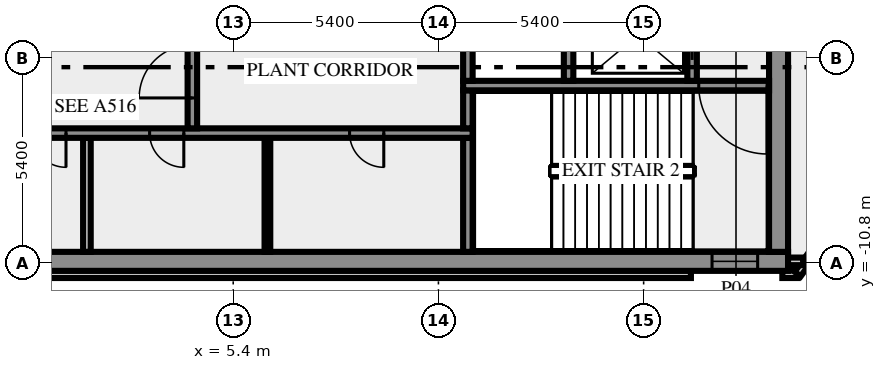
"""IFC4 building model, lengths in metres.
Left out: names, types, materials, properties, quantities, classifications, styles, units other than length and angle.
Written with IfcOpenShell. Run it as: python <this file> out.ifc"""

import sys

from ifc_helpers import new_model, si_unit, direction, frame, frame_2d, origin, place, context, subcontext, project, spatial, rectangle, extrude, element, fill, save


model = new_model("IFC4")
c1 = context("Model", 3, precision=1e-05, world=origin(), true_north=direction((0.0, 1.0)))
c2 = subcontext(c1, "Body", "Model", "MODEL_VIEW")
j1 = project(units=[si_unit("LENGTHUNIT", "METRE"), si_unit("PLANEANGLEUNIT", "RADIAN")], contexts=[c1])
p1 = place(None, origin())
s1 = spatial("IfcSite", under=j1, at=p1, CompositionType="ELEMENT")
p2 = place(p1, origin())
s2 = spatial("IfcBuilding", under=s1, at=p2, CompositionType="ELEMENT")
p3 = place(p2, frame((0.0, 0.0, 301.0)))
s3 = spatial("IfcBuildingStorey", under=s2, at=p3, CompositionType="ELEMENT", Elevation=301.0)
p4 = place(p3, frame((-17.444, -11.088, 0.0), z_axis=(0.0, 0.0, 1.0), x_axis=(1.0, 0.0, 0.0)))
e1 = element("IfcWall", 1, at=p4, inside=s3, PredefinedType="SOLIDWALL", context=c2, shape_type="SweptSolid", body=[
    extrude(rectangle(XDim=34.888, YDim=0.2, at=frame_2d((17.444, 0.0))), origin(), (0.0, 0.0, 1.0), 5.65),
])
p5 = place(p3, frame((19.85, -11.088, 0.0), z_axis=(0.0, 0.0, 1.0), x_axis=(1.0, 0.0, 0.0)))
e2 = element("IfcWall", 2, at=p5, inside=s3, PredefinedType="SOLIDWALL", context=c2, shape_type="SweptSolid", body=[
    extrude(rectangle(XDim=0.406, YDim=0.2, at=frame_2d((0.203, 0.0))), origin(), (0.0, 0.0, 1.0), 5.65),
])
p6 = place(p3, frame((20.253, -11.083, 0.0), z_axis=(0.0, 0.0, 1.0), x_axis=(0.587766567315, 0.809030569476, 0.0)))
e3 = element("IfcWall", 3, at=p6, inside=s3, PredefinedType="SOLIDWALL", context=c2, shape_type="SweptSolid", body=[
    extrude(rectangle(XDim=2.688, YDim=0.2, at=frame_2d((1.344, 0.0))), origin(), (0.0, 0.0, 1.0), 5.65),
])
p7 = place(p3, frame((19.98, -10.75, 0.0), z_axis=(0.0, 0.0, 1.0), x_axis=(1.0, 0.0, 0.0)))
e4 = element("IfcWall", 4, at=p7, inside=s3, PredefinedType="SOLIDWALL", context=c2, shape_type="SweptSolid", body=[
    extrude(rectangle(XDim=0.417, YDim=0.2, at=frame_2d((0.208, 0.0))), origin(), (0.0, 0.0, 1.0), 5.65),
])
p8 = place(p3, frame((-20.0, -10.75, 0.0), z_axis=(0.0, 0.0, 1.0), x_axis=(1.0, 0.0, 0.0)))
e5 = element("IfcWall", 5, at=p8, inside=s3, PredefinedType="SHEAR", context=c2, shape_type="SweptSolid", body=[
    extrude(rectangle(XDim=40.0, YDim=0.5, at=frame_2d((20.0, 0.0))), origin(), (0.0, 0.0, 1.0), 5.65),
])
p9 = place(p8, frame((0.8, 0.0, 1.0)))
e6 = element("IfcOpeningElement", 6, at=p9, cuts=e5, PredefinedType="OPENING", context=c2, shape_type="SweptSolid", body=[
    extrude(rectangle(XDim=1.2, YDim=1.2, at=frame_2d((0.6, 0.6))), frame((0.0, 0.26, 0.0), z_axis=(0.0, -1.0, 0.0), x_axis=(1.0, 0.0, 0.0)), (0.0, 0.0, 1.0), 0.52),
])
p10 = place(p8, frame((38.0, 0.0, 1.0)))
e7 = element("IfcOpeningElement", 7, at=p10, cuts=e5, PredefinedType="OPENING", context=c2, shape_type="SweptSolid", body=[
    extrude(rectangle(XDim=1.2, YDim=1.2, at=frame_2d((0.6, 0.6))), frame((0.0, 0.26, 0.0), z_axis=(0.0, -1.0, 0.0), x_axis=(1.0, 0.0, 0.0)), (0.0, 0.0, 1.0), 0.52),
])
p11 = place(p3, frame((1.55, -10.5, 0.0), z_axis=(0.0, 0.0, 1.0), x_axis=(0.0, 1.0, 0.0)))
e8 = element("IfcWall", 8, at=p11, inside=s3, PredefinedType="SOLIDWALL", context=c2, shape_type="SweptSolid", body=[
    extrude(rectangle(XDim=3.0, YDim=0.2, at=frame_2d((1.5, 0.0))), origin(), (0.0, 0.0, 1.0), 5.65),
])
p12 = place(p3, frame((6.3, -10.5, 0.0), z_axis=(0.0, 0.0, 1.0), x_axis=(0.0, 1.0, 0.0)))
e9 = element("IfcWall", 9, at=p12, inside=s3, PredefinedType="PARTITIONING", context=c2, shape_type="SweptSolid", body=[
    extrude(rectangle(XDim=3.0, YDim=0.15, at=frame_2d((1.5, 0.0))), origin(), (0.0, 0.0, 1.0), 5.65),
])
p13 = place(p3, frame((11.575, -10.5, 0.0), z_axis=(0.0, 0.0, 1.0), x_axis=(0.0, 1.0, 0.0)))
e10 = element("IfcWall", 10, at=p13, inside=s3, PredefinedType="SHEAR", context=c2, shape_type="SweptSolid", body=[
    extrude(rectangle(XDim=3.0, YDim=0.25, at=frame_2d((1.5, 0.0))), origin(), (0.0, 0.0, 1.0), 5.65),
])
p14 = place(p3, frame((19.75, -10.5, 0.0), z_axis=(0.0, 0.0, 1.0), x_axis=(0.0, 1.0, 0.0)))
e11 = element("IfcWall", 11, at=p14, inside=s3, PredefinedType="SHEAR", context=c2, shape_type="SweptSolid", body=[
    extrude(rectangle(XDim=8.8, YDim=0.5, at=frame_2d((4.4, 0.0))), origin(), (0.0, 0.0, 1.0), 5.65),
])
p15 = place(p3, frame((11.7, -7.375, 0.0), z_axis=(0.0, 0.0, 1.0), x_axis=(-1.0, 0.0, 0.0)))
e12 = element("IfcWall", 12, at=p15, inside=s3, PredefinedType="SHEAR", context=c2, shape_type="SweptSolid", body=[
    extrude(rectangle(XDim=23.4, YDim=0.25, at=frame_2d((11.7, 0.0))), origin(), (0.0, 0.0, 1.0), 5.65),
])
p16 = place(p15, frame((13.475, 0.0, 0.0)))
e13 = element("IfcOpeningElement", 13, at=p16, cuts=e12, PredefinedType="OPENING", context=c2, shape_type="SweptSolid", body=[
    extrude(rectangle(XDim=0.9, YDim=2.1, at=frame_2d((0.45, 1.05))), frame((0.0, 0.135, 0.0), z_axis=(0.0, -1.0, 0.0), x_axis=(1.0, 0.0, 0.0)), (0.0, 0.0, 1.0), 0.27),
])
p17 = place(p15, frame((10.7, 0.0, 0.0)))
e14 = element("IfcOpeningElement", 14, at=p17, cuts=e12, PredefinedType="OPENING", context=c2, shape_type="SweptSolid", body=[
    extrude(rectangle(XDim=0.9, YDim=2.1, at=frame_2d((0.45, 1.05))), frame((0.0, 0.135, 0.0), z_axis=(0.0, -1.0, 0.0), x_axis=(1.0, 0.0, 0.0)), (0.0, 0.0, 1.0), 0.27),
])
p18 = place(p15, frame((7.6, 0.0, 0.0)))
e15 = element("IfcOpeningElement", 15, at=p18, cuts=e12, PredefinedType="OPENING", context=c2, shape_type="SweptSolid", body=[
    extrude(rectangle(XDim=0.9, YDim=2.1, at=frame_2d((0.45, 1.05))), frame((0.0, 0.135, 0.0), z_axis=(0.0, -1.0, 0.0), x_axis=(1.0, 0.0, 0.0)), (0.0, 0.0, 1.0), 0.27),
])
p19 = place(p15, frame((2.338, 0.0, 0.0)))
e16 = element("IfcOpeningElement", 16, at=p19, cuts=e12, PredefinedType="OPENING", context=c2, shape_type="SweptSolid", body=[
    extrude(rectangle(XDim=0.9, YDim=2.1, at=frame_2d((0.45, 1.05))), frame((0.0, 0.135, 0.0), z_axis=(0.0, -1.0, 0.0), x_axis=(1.0, 0.0, 0.0)), (0.0, 0.0, 1.0), 0.27),
])
p20 = place(p3, frame((4.325, -7.25, 0.0), z_axis=(0.0, 0.0, 1.0), x_axis=(0.0, 1.0, 0.0)))
e17 = element("IfcWall", 17, at=p20, inside=s3, PredefinedType="SHEAR", context=c2, shape_type="SweptSolid", body=[
    extrude(rectangle(XDim=3.0, YDim=0.25, at=frame_2d((1.5, 0.0))), origin(), (0.0, 0.0, 1.0), 5.65),
])
p21 = place(p20, frame((0.8, 0.0, 0.0)))
e18 = element("IfcOpeningElement", 18, at=p21, cuts=e17, PredefinedType="OPENING", context=c2, shape_type="SweptSolid", body=[
    extrude(rectangle(XDim=1.4, YDim=2.1, at=frame_2d((0.7, 1.05))), frame((0.0, 0.135, 0.0), z_axis=(0.0, -1.0, 0.0), x_axis=(1.0, 0.0, 0.0)), (0.0, 0.0, 1.0), 0.27),
])
p22 = place(p3, frame((11.575, -7.25, 0.0), z_axis=(0.0, 0.0, 1.0), x_axis=(0.0, 1.0, 0.0)))
e19 = element("IfcWall", 19, at=p22, inside=s3, PredefinedType="SHEAR", context=c2, shape_type="SweptSolid", body=[
    extrude(rectangle(XDim=1.0, YDim=0.25, at=frame_2d((0.5, 0.0))), origin(), (0.0, 0.0, 1.0), 5.65),
])
p23 = place(p3, frame((19.5, -6.125, 0.0), z_axis=(0.0, 0.0, 1.0), x_axis=(-1.0, 0.0, 0.0)))
e20 = element("IfcWall", 20, at=p23, inside=s3, PredefinedType="SHEAR", context=c2, shape_type="SweptSolid", body=[
    extrude(rectangle(XDim=8.05, YDim=0.25, at=frame_2d((4.025, 0.0))), origin(), (0.0, 0.0, 1.0), 5.65),
])
p24 = place(p23, frame((0.05, 0.0, 0.0)))
e21 = element("IfcOpeningElement", 21, at=p24, cuts=e20, PredefinedType="OPENING", context=c2, shape_type="SweptSolid", body=[
    extrude(rectangle(XDim=1.8, YDim=2.1, at=frame_2d((0.9, 1.05))), frame((0.0, 0.135, 0.0), z_axis=(0.0, -1.0, 0.0), x_axis=(1.0, 0.0, 0.0)), (0.0, 0.0, 1.0), 0.27),
])
for number, where, z_axis, x_axis in (
    (22, (11.575, -6.0, 0.0), (0.0, 0.0, 1.0), (0.0, 1.0, 0.0)),
    (23, (14.225, -6.0, 0.0), (0.0, 0.0, 1.0), (0.0, 1.0, 0.0)),
):
    element("IfcWall", number, at=place(p3, frame(where, z_axis=z_axis, x_axis=x_axis)), inside=s3, PredefinedType="SHEAR", context=c2, shape_type="SweptSolid", body=[
        extrude(rectangle(XDim=1.75, YDim=0.25, at=frame_2d((0.875, 0.0))), origin(), (0.0, 0.0, 1.0), 5.65),
    ])
p25 = place(p3, frame((17.475, -6.0, 0.0), z_axis=(0.0, 0.0, 1.0), x_axis=(0.0, 1.0, 0.0)))
e24 = element("IfcWall", 24, at=p25, inside=s3, PredefinedType="SHEAR", context=c2, shape_type="SweptSolid", body=[
    extrude(rectangle(XDim=4.3, YDim=0.25, at=frame_2d((2.15, 0.0))), origin(), (0.0, 0.0, 1.0), 5.65),
])
p26 = place(p25, frame((0.55, 0.0, 0.0)))
e25 = element("IfcOpeningElement", 25, at=p26, cuts=e24, PredefinedType="OPENING", context=c2, shape_type="SweptSolid", body=[
    extrude(rectangle(XDim=1.3, YDim=2.1, at=frame_2d((0.65, 1.05))), frame((0.0, 0.135, 0.0), z_axis=(0.0, -1.0, 0.0), x_axis=(1.0, 0.0, 0.0)), (0.0, 0.0, 1.0), 0.27),
])
p27 = place(p10, origin())
e26 = element("IfcWindow", 26, at=p27, inside=s3, PartitioningType="SINGLE_PANEL", PredefinedType="WINDOW", context=c2, shape_type="SweptSolid", body=[
    extrude(rectangle(XDim=1.2, YDim=1.2, at=frame_2d((0.6, 0.6))), frame((0.0, 0.03, 0.0), z_axis=(0.0, -1.0, 0.0), x_axis=(1.0, 0.0, 0.0)), (0.0, 0.0, 1.0), 0.06),
])
fill(e7, e26)
p28 = place(p17, origin())
e27 = element("IfcDoor", 27, at=p28, inside=s3, OperationType="SINGLE_SWING_LEFT", PredefinedType="DOOR", context=c2, shape_type="SweptSolid", body=[
    extrude(rectangle(XDim=0.9, YDim=2.1, at=frame_2d((0.45, 1.05))), frame((0.0, 0.025, 0.0), z_axis=(0.0, -1.0, 0.0), x_axis=(1.0, 0.0, 0.0)), (0.0, 0.0, 1.0), 0.05),
])
fill(e14, e27)
p29 = place(p18, origin())
e28 = element("IfcDoor", 28, at=p29, inside=s3, OperationType="SINGLE_SWING_LEFT", PredefinedType="DOOR", context=c2, shape_type="SweptSolid", body=[
    extrude(rectangle(XDim=0.9, YDim=2.1, at=frame_2d((0.45, 1.05))), frame((0.0, 0.025, 0.0), z_axis=(0.0, -1.0, 0.0), x_axis=(1.0, 0.0, 0.0)), (0.0, 0.0, 1.0), 0.05),
])
fill(e15, e28)
p30 = place(p19, origin())
e29 = element("IfcDoor", 29, at=p30, inside=s3, OperationType="SINGLE_SWING_LEFT", PredefinedType="DOOR", context=c2, shape_type="SweptSolid", body=[
    extrude(rectangle(XDim=0.9, YDim=2.1, at=frame_2d((0.45, 1.05))), frame((0.0, 0.025, 0.0), z_axis=(0.0, -1.0, 0.0), x_axis=(1.0, 0.0, 0.0)), (0.0, 0.0, 1.0), 0.05),
])
fill(e16, e29)
p31 = place(p21, origin())
e30 = element("IfcDoor", 30, at=p31, inside=s3, OperationType="DOUBLE_DOOR_SINGLE_SWING", PredefinedType="DOOR", context=c2, shape_type="SweptSolid", body=[
    extrude(rectangle(XDim=1.4, YDim=2.1, at=frame_2d((0.7, 1.05))), frame((0.0, 0.025, 0.0), z_axis=(0.0, -1.0, 0.0), x_axis=(1.0, 0.0, 0.0)), (0.0, 0.0, 1.0), 0.05),
])
fill(e18, e30)
p32 = place(p24, origin())
e31 = element("IfcDoor", 31, at=p32, inside=s3, OperationType="DOUBLE_DOOR_SINGLE_SWING", PredefinedType="DOOR", context=c2, shape_type="SweptSolid", body=[
    extrude(rectangle(XDim=1.8, YDim=2.1, at=frame_2d((0.9, 1.05))), frame((0.0, 0.025, 0.0), z_axis=(0.0, -1.0, 0.0), x_axis=(1.0, 0.0, 0.0)), (0.0, 0.0, 1.0), 0.05),
])
fill(e21, e31)
p33 = place(p26, origin())
e32 = element("IfcDoor", 32, at=p33, inside=s3, OperationType="DOUBLE_DOOR_SLIDING", PredefinedType="DOOR", context=c2, shape_type="SweptSolid", body=[
    extrude(rectangle(XDim=1.3, YDim=2.1, at=frame_2d((0.65, 1.05))), frame((0.0, 0.025, 0.0), z_axis=(0.0, -1.0, 0.0), x_axis=(1.0, 0.0, 0.0)), (0.0, 0.0, 1.0), 0.05),
])
fill(e25, e32)
save(model, sys.argv[1])
